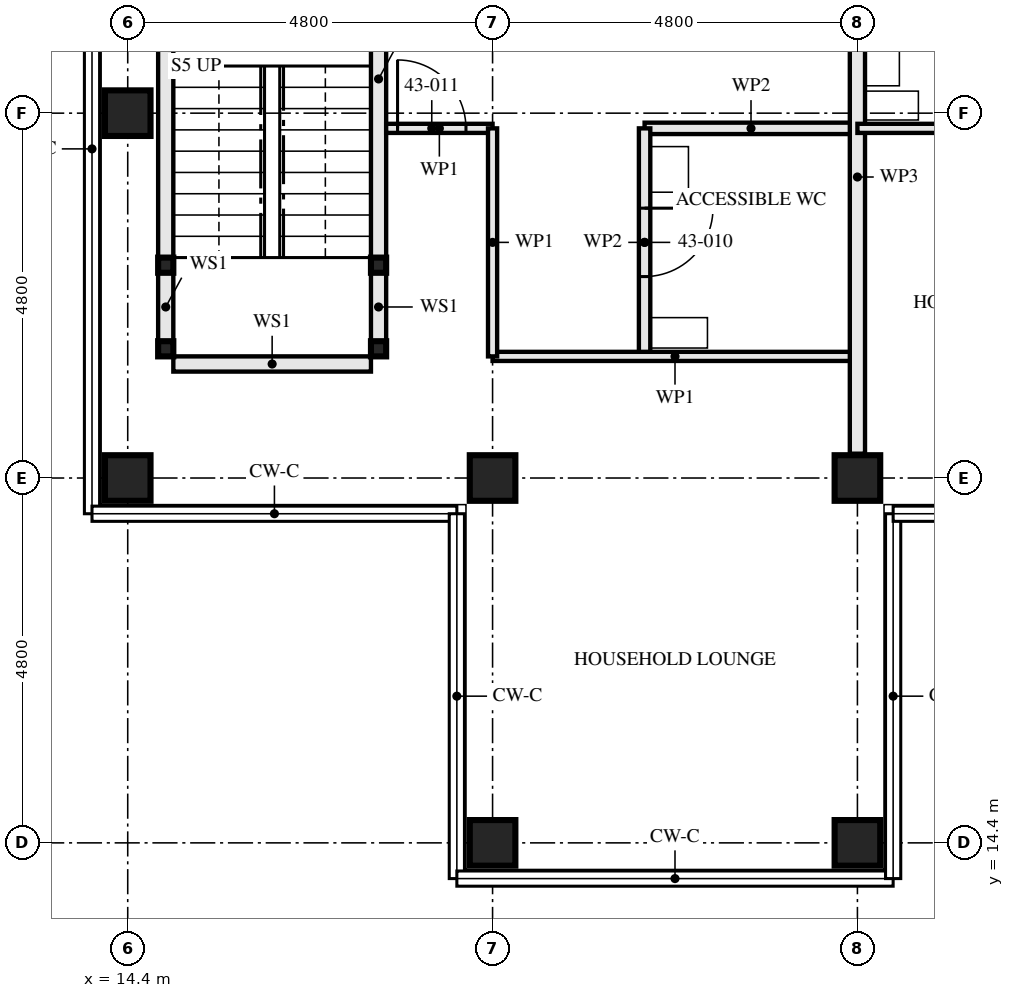
"""IFC4 building model, lengths in metres.
Left out: names, types, materials, properties, quantities, classifications, styles, units other than length and angle.
Written with IfcOpenShell. Run it as: python <this file> out.ifc"""

import sys

from ifc_helpers import new_model, si_unit, direction, frame, frame_2d, origin, origin_2d, place, context, subcontext, project, spatial, rectangle, hollow_rectangle, extrude, element, fill, save


model = new_model("IFC4")
c1 = context("Model", 3, precision=1e-05, world=origin(), true_north=direction((0.0, 1.0)))
c2 = subcontext(c1, "Body", "Model", "MODEL_VIEW")
j1 = project(units=[si_unit("LENGTHUNIT", "METRE"), si_unit("PLANEANGLEUNIT", "RADIAN")], contexts=[c1])
p1 = place(None, origin())
s1 = spatial("IfcSite", under=j1, at=p1, CompositionType="ELEMENT")
p2 = place(p1, origin())
s2 = spatial("IfcBuilding", under=s1, at=p2, CompositionType="ELEMENT")
p3 = place(p2, frame((0.0, 0.0, 158.5)))
s3 = spatial("IfcBuildingStorey", under=s2, at=p3, CompositionType="ELEMENT", Elevation=158.5)
p4 = place(p3, frame((14.4, 19.2, 0.0), z_axis=(0.0, 0.0, 1.0), x_axis=(0.0, 1.0, 0.0)))
e1 = element("IfcColumn", 1, at=p4, inside=s3, PredefinedType="COLUMN", context=c2, shape_type="SweptSolid", body=[
    extrude(hollow_rectangle(XDim=0.6, YDim=0.6, WallThickness=0.06, at=origin_2d()), origin(), (0.0, 0.0, 1.0), 3.5),
])
p5 = place(p3, frame((14.4, 24.0, 0.0), z_axis=(0.0, 0.0, 1.0), x_axis=(1.0, 0.0, 0.0)))
e2 = element("IfcColumn", 2, at=p5, inside=s3, PredefinedType="COLUMN", context=c2, shape_type="SweptSolid", body=[
    extrude(hollow_rectangle(XDim=0.6, YDim=0.6, WallThickness=0.08, at=origin_2d()), origin(), (0.0, 0.0, 1.0), 3.5),
])
for number, where, z_axis, x_axis in (
    (3, (19.2, 14.4, 0.0), (0.0, 0.0, 1.0), (0.0, 1.0, 0.0)),
    (4, (19.2, 19.2, 0.0), (0.0, 0.0, 1.0), (0.0, 1.0, 0.0)),
    (5, (24.0, 14.4, 0.0), (0.0, 0.0, 1.0), (0.0, 1.0, 0.0)),
    (6, (24.0, 19.2, 0.0), (0.0, 0.0, 1.0), (0.0, 1.0, 0.0)),
):
    element("IfcColumn", number, at=place(p3, frame(where, z_axis=z_axis, x_axis=x_axis)), inside=s3, PredefinedType="COLUMN", context=c2, shape_type="SweptSolid", body=[
        extrude(hollow_rectangle(XDim=0.6, YDim=0.6, WallThickness=0.06, at=origin_2d()), origin(), (0.0, 0.0, 1.0), 3.5),
    ])
for number, where, z_axis, x_axis in (
    (7, (14.9, 20.9, 0.0), (0.0, 0.0, 1.0), (1.0, 0.0, 0.0)),
    (8, (17.7, 20.9, 0.0), (0.0, 0.0, 1.0), (1.0, 0.0, 0.0)),
    (9, (14.9, 22.0, 0.0), (0.0, 0.0, 1.0), (1.0, 0.0, 0.0)),
    (10, (17.7, 22.0, 0.0), (0.0, 0.0, 1.0), (1.0, 0.0, 0.0)),
):
    element("IfcColumn", number, at=place(p3, frame(where, z_axis=z_axis, x_axis=x_axis)), inside=s3, PredefinedType="COLUMN", context=c2, shape_type="SweptSolid", body=[
        extrude(hollow_rectangle(XDim=0.2, YDim=0.2, WallThickness=0.008, at=origin_2d()), origin(), (0.0, 0.0, 1.0), 3.33),
    ])
p6 = place(p3, frame((14.9, 21.0, 0.0), z_axis=(0.0, 0.0, 1.0), x_axis=(0.0, 1.0, 0.0)))
e11 = element("IfcWall", 11, at=p6, inside=s3, PredefinedType="SOLIDWALL", context=c2, shape_type="SweptSolid", body=[
    extrude(rectangle(XDim=0.9, YDim=0.2, at=frame_2d((0.45, 0.0))), origin(), (0.0, 0.0, 1.0), 2.99),
])
p7 = place(p3, frame((14.9, 22.1, 0.0), z_axis=(0.0, 0.0, 1.0), x_axis=(0.0, 1.0, 0.0)))
e12 = element("IfcWall", 12, at=p7, inside=s3, PredefinedType="SOLIDWALL", context=c2, shape_type="SweptSolid", body=[
    extrude(rectangle(XDim=4.7, YDim=0.2, at=frame_2d((2.35, 0.0))), origin(), (0.0, 0.0, 1.0), 2.99),
])
p8 = place(p3, frame((17.7, 21.0, 0.0), z_axis=(0.0, 0.0, 1.0), x_axis=(0.0, 1.0, 0.0)))
e13 = element("IfcWall", 13, at=p8, inside=s3, PredefinedType="SOLIDWALL", context=c2, shape_type="SweptSolid", body=[
    extrude(rectangle(XDim=0.9, YDim=0.2, at=frame_2d((0.45, 0.0))), origin(), (0.0, 0.0, 1.0), 2.99),
])
p9 = place(p3, frame((17.7, 22.1, 0.0), z_axis=(0.0, 0.0, 1.0), x_axis=(0.0, 1.0, 0.0)))
e14 = element("IfcWall", 14, at=p9, inside=s3, PredefinedType="SOLIDWALL", context=c2, shape_type="SweptSolid", body=[
    extrude(rectangle(XDim=4.7, YDim=0.2, at=frame_2d((2.35, 0.0))), origin(), (0.0, 0.0, 1.0), 2.99),
])
p10 = place(p3, frame((15.0, 20.7, 0.0), z_axis=(0.0, 0.0, 1.0), x_axis=(1.0, 0.0, 0.0)))
e15 = element("IfcWall", 15, at=p10, inside=s3, PredefinedType="SOLIDWALL", context=c2, shape_type="SweptSolid", body=[
    extrude(rectangle(XDim=2.6, YDim=0.2, at=frame_2d((1.3, 0.0))), origin(), (0.0, 0.0, 1.0), 3.33),
])
p11 = place(p3, frame((21.2, 20.8, 0.0), z_axis=(0.0, 0.0, 1.0), x_axis=(0.0, 1.0, 0.0)))
e16 = element("IfcWall", 16, at=p11, inside=s3, PredefinedType="PARTITIONING", context=c2, shape_type="SweptSolid", body=[
    extrude(rectangle(XDim=3.0, YDim=0.15, at=frame_2d((1.5, 0.0))), origin(), (0.0, 0.0, 1.0), 3.33),
])
p12 = place(p11, frame((1.05, 0.0, 0.0)))
e17 = element("IfcOpeningElement", 17, at=p12, cuts=e16, PredefinedType="OPENING", context=c2, shape_type="SweptSolid", body=[
    extrude(rectangle(XDim=0.9, YDim=2.1, at=frame_2d((0.45, 1.05))), frame((0.0, 0.085, 0.0), z_axis=(0.0, -1.0, 0.0), x_axis=(1.0, 0.0, 0.0)), (0.0, 0.0, 1.0), 0.171),
])
p13 = place(p3, frame((21.2, 23.8, 0.0), z_axis=(0.0, 0.0, 1.0), x_axis=(1.0, 0.0, 0.0)))
e18 = element("IfcWall", 18, at=p13, inside=s3, PredefinedType="PARTITIONING", context=c2, shape_type="SweptSolid", body=[
    extrude(rectangle(XDim=2.8, YDim=0.15, at=frame_2d((1.4, 0.0))), origin(), (0.0, 0.0, 1.0), 3.33),
])
p14 = place(p3, frame((17.8, 23.8, 0.0), z_axis=(0.0, 0.0, 1.0), x_axis=(1.0, 0.0, 0.0)))
e19 = element("IfcWall", 19, at=p14, inside=s3, PredefinedType="PARTITIONING", context=c2, shape_type="SweptSolid", body=[
    extrude(rectangle(XDim=1.4, YDim=0.12, at=frame_2d((0.7, 0.0))), origin(), (0.0, 0.0, 1.0), 3.33),
])
p15 = place(p14, frame((0.15, 0.0, 0.0)))
e20 = element("IfcOpeningElement", 20, at=p15, cuts=e19, PredefinedType="OPENING", context=c2, shape_type="SweptSolid", body=[
    extrude(rectangle(XDim=0.9, YDim=2.1, at=frame_2d((0.45, 1.05))), frame((0.0, 0.071, 0.0), z_axis=(0.0, -1.0, 0.0), x_axis=(1.0, 0.0, 0.0)), (0.0, 0.0, 1.0), 0.141),
])
p16 = place(p3, frame((19.2, 20.8, 0.0), z_axis=(0.0, 0.0, 1.0), x_axis=(1.0, 0.0, 0.0)))
e21 = element("IfcWall", 21, at=p16, inside=s3, PredefinedType="PARTITIONING", context=c2, shape_type="SweptSolid", body=[
    extrude(rectangle(XDim=4.8, YDim=0.12, at=frame_2d((2.4, 0.0))), origin(), (0.0, 0.0, 1.0), 3.33),
])
p17 = place(p3, frame((19.2, 20.8, 0.0), z_axis=(0.0, 0.0, 1.0), x_axis=(0.0, 1.0, 0.0)))
e22 = element("IfcWall", 22, at=p17, inside=s3, PredefinedType="PARTITIONING", context=c2, shape_type="SweptSolid", body=[
    extrude(rectangle(XDim=3.0, YDim=0.12, at=frame_2d((1.5, 0.0))), origin(), (0.0, 0.0, 1.0), 2.55),
])
p18 = place(p3, frame((24.0, 19.52, 0.0), z_axis=(0.0, 0.0, 1.0), x_axis=(0.0, 1.0, 0.0)))
e23 = element("IfcWall", 23, at=p18, inside=s3, PredefinedType="PARTITIONING", context=c2, shape_type="SweptSolid", body=[
    extrude(rectangle(XDim=7.28, YDim=0.2, at=frame_2d((3.64, 0.0))), origin(), (0.0, 0.0, 1.0), 2.55),
])
p19 = place(p3, frame((24.0, 23.8, 0.0), z_axis=(0.0, 0.0, 1.0), x_axis=(1.0, 0.0, 0.0)))
e24 = element("IfcWall", 24, at=p19, inside=s3, PredefinedType="PARTITIONING", context=c2, shape_type="SweptSolid", body=[
    extrude(rectangle(XDim=4.48, YDim=0.12, at=frame_2d((2.24, 0.0))), origin(), (0.0, 0.0, 1.0), 3.33),
])
p20 = place(p19, frame((2.975, 0.0, 0.0)))
e25 = element("IfcOpeningElement", 25, at=p20, cuts=e24, PredefinedType="OPENING", context=c2, shape_type="SweptSolid", body=[
    extrude(rectangle(XDim=0.9, YDim=2.1, at=frame_2d((0.45, 1.05))), frame((0.0, 0.071, 0.0), z_axis=(0.0, -1.0, 0.0), x_axis=(1.0, 0.0, 0.0)), (0.0, 0.0, 1.0), 0.141),
])
p21 = place(p12, frame((0.9, 0.0, 0.0), z_axis=(0.0, 0.0, 1.0), x_axis=(-1.0, 0.0, 0.0)))
e26 = element("IfcDoor", 26, at=p21, inside=s3, OperationType="SINGLE_SWING_RIGHT", PredefinedType="DOOR", context=c2, shape_type="SweptSolid", body=[
    extrude(rectangle(XDim=0.9, YDim=2.1, at=frame_2d((0.45, 1.05))), frame((0.0, 0.022, 0.0), z_axis=(0.0, -1.0, 0.0), x_axis=(1.0, 0.0, 0.0)), (0.0, 0.0, 1.0), 0.044),
])
fill(e17, e26)
p22 = place(p15, origin())
e27 = element("IfcDoor", 27, at=p22, inside=s3, OperationType="SINGLE_SWING_RIGHT", PredefinedType="DOOR", context=c2, shape_type="SweptSolid", body=[
    extrude(rectangle(XDim=0.9, YDim=2.1, at=frame_2d((0.45, 1.05))), frame((0.0, 0.022, 0.0), z_axis=(0.0, -1.0, 0.0), x_axis=(1.0, 0.0, 0.0)), (0.0, 0.0, 1.0), 0.044),
])
fill(e20, e27)
save(model, sys.argv[1])
